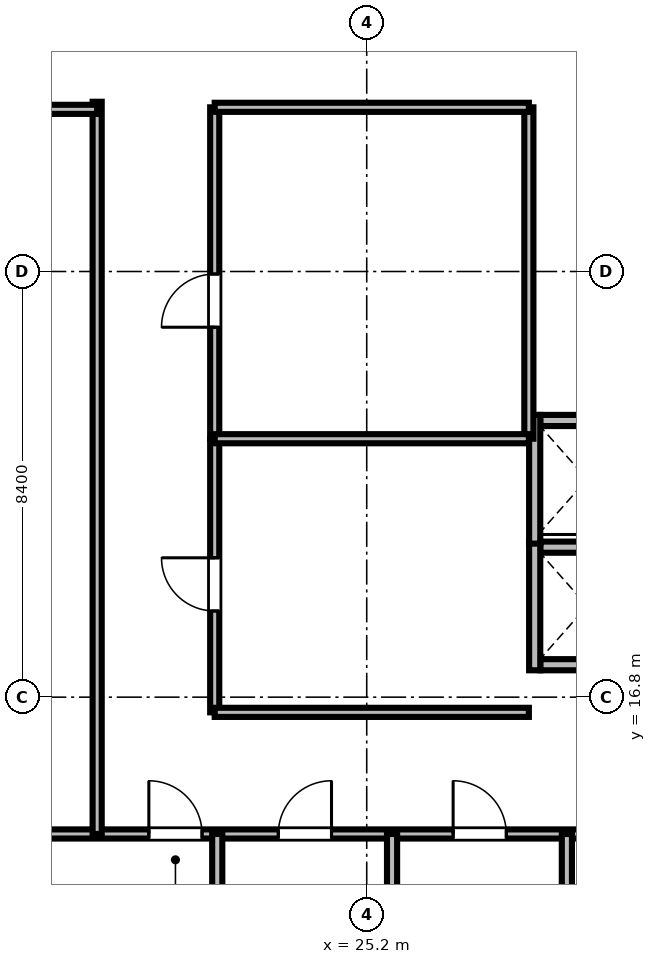
"""IFC4 building model, lengths in metres.
Left out: names, types, materials, properties, quantities, classifications, styles, units other than length and angle.
Written with IfcOpenShell. Run it as: python <this file> out.ifc"""

import sys

from ifc_helpers import new_model, si_unit, direction, frame, frame_2d, origin, place, context, subcontext, project, spatial, rectangle, extrude, source, transform, mapped, element, fill, save


model = new_model("IFC4")
c1 = context("Model", 3, precision=1e-05, world=origin(), true_north=direction((0.0, 1.0)))
c2 = subcontext(c1, "Body", "Model", "MODEL_VIEW")
j1 = project(units=[si_unit("LENGTHUNIT", "METRE"), si_unit("PLANEANGLEUNIT", "RADIAN")], contexts=[c1])
p1 = place(None, origin())
s1 = spatial("IfcSite", under=j1, at=p1, CompositionType="ELEMENT")
p2 = place(p1, origin())
s2 = spatial("IfcBuilding", under=s1, at=p2, CompositionType="ELEMENT")
p3 = place(p2, frame((0.0, 0.0, 122.4)))
s3 = spatial("IfcBuildingStorey", under=s2, at=p3, CompositionType="ELEMENT", Elevation=122.4)
m1 = source(origin(), c2, "Body", "SweptSolid", [
    extrude(rectangle(XDim=1.85, YDim=0.22, at=frame_2d((0.925, 0.0))), origin(), (0.0, 0.0, 1.0), 3.46),
])
for number, where, z_axis, x_axis in (
    (1, (28.625, 17.44, 0.0), (0.0, 0.0, 1.0), (1.0, 0.0, 0.0)),
    (2, (28.625, 19.76, 0.0), (0.0, 0.0, 1.0), (1.0, 0.0, 0.0)),
):
    element("IfcWall", number, at=place(p3, frame(where, z_axis=z_axis, x_axis=x_axis)), inside=s3, PredefinedType="SOLIDWALL", context=c2, shape_type="MappedRepresentation", body=[
        mapped(m1, transform((0.0, 0.0, 0.0), scale=1.0)),
    ])
m2 = source(origin(), c2, "Body", "SweptSolid", [
    extrude(rectangle(XDim=2.54, YDim=0.22, at=frame_2d((1.27, 0.0))), origin(), (0.0, 0.0, 1.0), 3.46),
])
p4 = place(p3, frame((28.515, 17.33, 0.0), z_axis=(0.0, 0.0, 1.0), x_axis=(0.0, 1.0, 0.0)))
e3 = element("IfcWall", 3, at=p4, inside=s3, PredefinedType="SOLIDWALL", context=c2, shape_type="MappedRepresentation", body=[
    mapped(m2, transform((0.0, 0.0, 0.0), scale=1.0)),
])
p5 = place(p3, frame((28.625, 22.26, 0.0), z_axis=(0.0, 0.0, 1.0), x_axis=(1.0, 0.0, 0.0)))
e4 = element("IfcWall", 4, at=p5, inside=s3, PredefinedType="SOLIDWALL", context=c2, shape_type="MappedRepresentation", body=[
    mapped(m1, transform((0.0, 0.0, 0.0), scale=1.0)),
])
p6 = place(p3, frame((28.515, 19.83, 0.0), z_axis=(0.0, 0.0, 1.0), x_axis=(0.0, 1.0, 0.0)))
e5 = element("IfcWall", 5, at=p6, inside=s3, PredefinedType="SOLIDWALL", context=c2, shape_type="MappedRepresentation", body=[
    mapped(m2, transform((0.0, 0.0, 0.0), scale=1.0)),
])
m3 = source(origin(), c2, "Body", "SweptSolid", [
    extrude(rectangle(XDim=46.156, YDim=0.18, at=frame_2d((23.078, 0.0))), origin(), (0.0, 0.0, 1.0), 2.702),
])
p7 = place(p3, frame((6.922, 14.1, 0.0), z_axis=(0.0, 0.0, 1.0), x_axis=(1.0, 0.0, 0.0)))
e6 = element("IfcWall", 6, at=p7, inside=s3, PredefinedType="PARTITIONING", context=c2, shape_type="MappedRepresentation", body=[
    mapped(m3, transform((0.0, 0.0, 0.0), scale=1.0)),
])
m4 = source(origin(), c2, "Body", "SweptSolid", [
    extrude(rectangle(XDim=1.05, YDim=2.2, at=frame_2d((0.525, 1.1))), frame((0.0, 0.1, 0.0), z_axis=(0.0, -1.0, 0.0), x_axis=(1.0, 0.0, 0.0)), (0.0, 0.0, 1.0), 0.2),
])
p8 = place(p7, frame((13.978, 0.0, 0.0)))
e7 = element("IfcOpeningElement", 7, at=p8, cuts=e6, PredefinedType="OPENING", context=c2, shape_type="MappedRepresentation", body=[
    mapped(m4, transform((0.0, 0.0, 0.0), scale=1.0)),
])
p9 = place(p7, frame((16.533, 0.0, 0.0)))
e8 = element("IfcOpeningElement", 8, at=p9, cuts=e6, PredefinedType="OPENING", context=c2, shape_type="MappedRepresentation", body=[
    mapped(m4, transform((0.0, 0.0, 0.0), scale=1.0)),
])
p10 = place(p7, frame((19.983, 0.0, 0.0)))
e9 = element("IfcOpeningElement", 9, at=p10, cuts=e6, PredefinedType="OPENING", context=c2, shape_type="MappedRepresentation", body=[
    mapped(m4, transform((0.0, 0.0, 0.0), scale=1.0)),
])
p11 = place(p7, frame((23.767, 0.0, 0.0)))
e10 = element("IfcOpeningElement", 10, at=p11, cuts=e6, PredefinedType="OPENING", context=c2, shape_type="MappedRepresentation", body=[
    mapped(m4, transform((0.0, 0.0, 0.0), scale=1.0)),
])
p12 = place(p7, frame((29.087, 0.0, 0.0)))
e11 = element("IfcOpeningElement", 11, at=p12, cuts=e6, PredefinedType="OPENING", context=c2, shape_type="MappedRepresentation", body=[
    mapped(m4, transform((0.0, 0.0, 0.0), scale=1.0)),
])
p13 = place(p7, frame((34.073, 0.0, 0.0)))
e12 = element("IfcOpeningElement", 12, at=p13, cuts=e6, PredefinedType="OPENING", context=c2, shape_type="MappedRepresentation", body=[
    mapped(m4, transform((0.0, 0.0, 0.0), scale=1.0)),
])
p14 = place(p7, frame((37.822, 0.0, 0.0)))
e13 = element("IfcOpeningElement", 13, at=p14, cuts=e6, PredefinedType="OPENING", context=c2, shape_type="MappedRepresentation", body=[
    mapped(m4, transform((0.0, 0.0, 0.0), scale=1.0)),
])
p15 = place(p7, frame((41.828, 0.0, 0.0)))
e14 = element("IfcOpeningElement", 14, at=p15, cuts=e6, PredefinedType="OPENING", context=c2, shape_type="MappedRepresentation", body=[
    mapped(m4, transform((0.0, 0.0, 0.0), scale=1.0)),
])
m5 = source(origin(), c2, "Body", "SweptSolid", [
    extrude(rectangle(XDim=6.54, YDim=0.18, at=frame_2d((3.27, 0.0))), origin(), (0.0, 0.0, 1.0), 2.852),
])
p16 = place(p3, frame((22.2, 21.9, 0.0), z_axis=(0.0, 0.0, 1.0), x_axis=(0.0, 1.0, 0.0)))
e15 = element("IfcWall", 15, at=p16, inside=s3, PredefinedType="PARTITIONING", context=c2, shape_type="MappedRepresentation", body=[
    mapped(m5, transform((0.0, 0.0, 0.0), scale=1.0)),
])
p17 = place(p16, frame((2.2, 0.0, 0.0)))
e16 = element("IfcOpeningElement", 16, at=p17, cuts=e15, PredefinedType="OPENING", context=c2, shape_type="MappedRepresentation", body=[
    mapped(m4, transform((0.0, 0.0, 0.0), scale=1.0)),
])
m6 = source(origin(), c2, "Body", "SweptSolid", [
    extrude(rectangle(XDim=5.4, YDim=0.18, at=frame_2d((2.7, 0.0))), origin(), (0.0, 0.0, 1.0), 2.852),
])
p18 = place(p3, frame((22.2, 16.5, 0.0), z_axis=(0.0, 0.0, 1.0), x_axis=(0.0, 1.0, 0.0)))
e17 = element("IfcWall", 17, at=p18, inside=s3, PredefinedType="PARTITIONING", context=c2, shape_type="MappedRepresentation", body=[
    mapped(m6, transform((0.0, 0.0, 0.0), scale=1.0)),
])
p19 = place(p18, frame((2.0, 0.0, 0.0)))
e18 = element("IfcOpeningElement", 18, at=p19, cuts=e17, PredefinedType="OPENING", context=c2, shape_type="MappedRepresentation", body=[
    mapped(m4, transform((0.0, 0.0, 0.0), scale=1.0)),
])
m7 = source(origin(), c2, "Body", "SweptSolid", [
    extrude(rectangle(XDim=14.45, YDim=0.18, at=frame_2d((7.225, 0.0))), origin(), (0.0, 0.0, 1.0), 2.852),
])
p20 = place(p3, frame((19.88, 14.1, 0.0), z_axis=(0.0, 0.0, 1.0), x_axis=(0.0, 1.0, 0.0)))
e19 = element("IfcWall", 19, at=p20, inside=s3, PredefinedType="PARTITIONING", context=c2, shape_type="MappedRepresentation", body=[
    mapped(m7, transform((0.0, 0.0, 0.0), scale=1.0)),
])
m8 = source(origin(), c2, "Body", "SweptSolid", [
    extrude(rectangle(XDim=13.15, YDim=0.18, at=frame_2d((6.575, 0.0))), origin(), (0.0, 0.0, 1.0), 2.702),
])
p21 = place(p3, frame((6.73, 28.4, 0.0), z_axis=(0.0, 0.0, 1.0), x_axis=(1.0, 0.0, 0.0)))
e20 = element("IfcWall", 20, at=p21, inside=s3, PredefinedType="PARTITIONING", context=c2, shape_type="MappedRepresentation", body=[
    mapped(m8, transform((0.0, 0.0, 0.0), scale=1.0)),
])
m9 = source(origin(), c2, "Body", "SweptSolid", [
    extrude(rectangle(XDim=11.978, YDim=0.2, at=frame_2d((5.989, 0.0))), origin(), (0.0, 0.0, 1.0), 2.702),
])
for number, where, z_axis, x_axis in (
    (21, (22.25, 2.122, 0.0), (0.0, 0.0, 1.0), (0.0, 1.0, 0.0)),
    (22, (25.7, 2.122, 0.0), (0.0, 0.0, 1.0), (0.0, 1.0, 0.0)),
):
    element("IfcWall", number, at=place(p3, frame(where, z_axis=z_axis, x_axis=x_axis)), inside=s3, PredefinedType="PARTITIONING", context=c2, shape_type="MappedRepresentation", body=[
        mapped(m9, transform((0.0, 0.0, 0.0), scale=1.0)),
    ])
m10 = source(origin(), c2, "Body", "SweptSolid", [
    extrude(rectangle(XDim=12.17, YDim=0.2, at=frame_2d((6.085, 0.0))), origin(), (0.0, 0.0, 1.0), 2.702),
])
p22 = place(p3, frame((29.15, 1.93, 0.0), z_axis=(0.0, 0.0, 1.0), x_axis=(0.0, 1.0, 0.0)))
e23 = element("IfcWall", 23, at=p22, inside=s3, PredefinedType="PARTITIONING", context=c2, shape_type="MappedRepresentation", body=[
    mapped(m10, transform((0.0, 0.0, 0.0), scale=1.0)),
])
p23 = place(p3, frame((28.4, 21.9, 0.0), z_axis=(0.0, 0.0, 1.0), x_axis=(0.0, 1.0, 0.0)))
e24 = element("IfcWall", 24, at=p23, inside=s3, PredefinedType="PARTITIONING", context=c2, shape_type="MappedRepresentation", body=[
    mapped(m5, transform((0.0, 0.0, 0.0), scale=1.0)),
])
m11 = source(origin(), c2, "Body", "SweptSolid", [
    extrude(rectangle(XDim=6.2, YDim=0.18, at=frame_2d((3.1, 0.0))), origin(), (0.0, 0.0, 1.0), 3.46),
])
for number, where, z_axis, x_axis in (
    (25, (22.2, 16.5, 0.0), (0.0, 0.0, 1.0), (1.0, 0.0, 0.0)),
    (26, (22.2, 21.9, 0.0), (0.0, 0.0, 1.0), (1.0, 0.0, 0.0)),
    (27, (22.2, 28.44, 0.0), (0.0, 0.0, 1.0), (1.0, 0.0, 0.0)),
):
    element("IfcWall", number, at=place(p3, frame(where, z_axis=z_axis, x_axis=x_axis)), inside=s3, PredefinedType="PARTITIONING", context=c2, shape_type="MappedRepresentation", body=[
        mapped(m11, transform((0.0, 0.0, 0.0), scale=1.0)),
    ])
m12 = source(origin(), c2, "Body", "SweptSolid", [
    extrude(rectangle(XDim=1.05, YDim=2.2, at=frame_2d((0.525, 1.1))), frame((0.0, 0.025, 0.0), z_axis=(0.0, -1.0, 0.0), x_axis=(1.0, 0.0, 0.0)), (0.0, 0.0, 1.0), 0.05),
])
p24 = place(p8, origin())
e28 = element("IfcDoor", 28, at=p24, inside=s3, OperationType="SINGLE_SWING_LEFT", PredefinedType="DOOR", context=c2, shape_type="MappedRepresentation", body=[
    mapped(m12, transform((0.0, 0.0, 0.0), scale=1.0)),
])
fill(e7, e28)
p25 = place(p9, origin())
e29 = element("IfcDoor", 29, at=p25, inside=s3, OperationType="SINGLE_SWING_RIGHT", PredefinedType="DOOR", context=c2, shape_type="MappedRepresentation", body=[
    mapped(m12, transform((0.0, 0.0, 0.0), scale=1.0)),
])
fill(e8, e29)
p26 = place(p10, origin())
e30 = element("IfcDoor", 30, at=p26, inside=s3, OperationType="SINGLE_SWING_LEFT", PredefinedType="DOOR", context=c2, shape_type="MappedRepresentation", body=[
    mapped(m12, transform((0.0, 0.0, 0.0), scale=1.0)),
])
fill(e9, e30)
p27 = place(p17, origin())
e31 = element("IfcDoor", 31, at=p27, inside=s3, OperationType="SINGLE_SWING_LEFT", PredefinedType="DOOR", context=c2, shape_type="MappedRepresentation", body=[
    mapped(m12, transform((0.0, 0.0, 0.0), scale=1.0)),
])
fill(e16, e31)
p28 = place(p19, origin())
e32 = element("IfcDoor", 32, at=p28, inside=s3, OperationType="SINGLE_SWING_RIGHT", PredefinedType="DOOR", context=c2, shape_type="MappedRepresentation", body=[
    mapped(m12, transform((0.0, 0.0, 0.0), scale=1.0)),
])
fill(e18, e32)
save(model, sys.argv[1])
